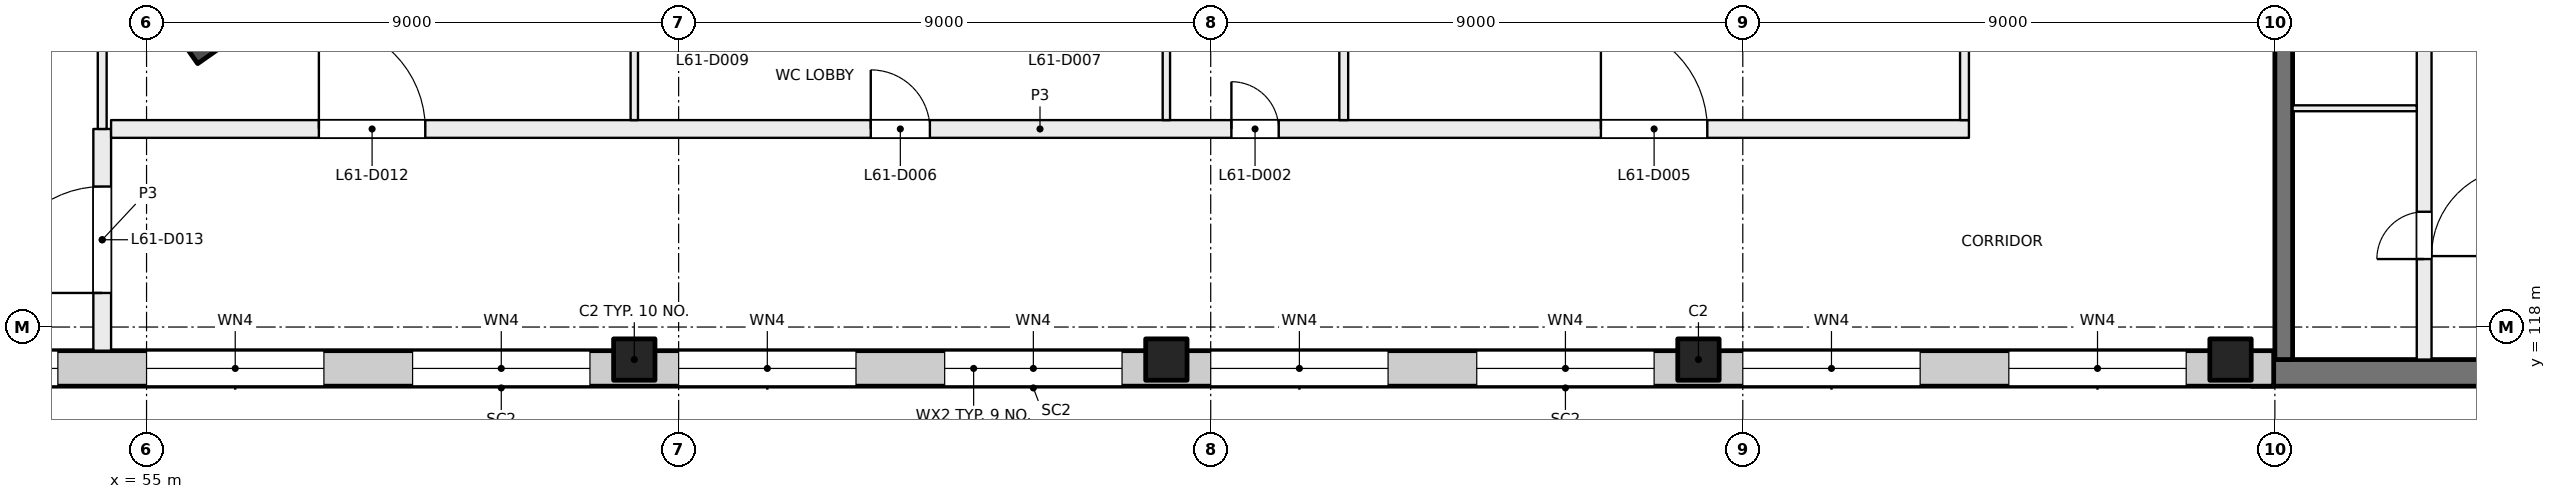
"""IFC4 building model, lengths in metres.
Left out: names, types, materials, properties, quantities, classifications, styles, units other than length and angle.
Written with IfcOpenShell. Run it as: python <this file> out.ifc"""

import sys

from ifc_helpers import new_model, si_unit, direction, frame, frame_2d, origin, origin_2d, place, context, subcontext, project, spatial, rectangle, hollow_rectangle, extrude, element, fill, save


model = new_model("IFC4")
c1 = context("Model", 3, precision=1e-05, world=origin(), true_north=direction((0.0, 1.0)))
c2 = subcontext(c1, "Body", "Model", "MODEL_VIEW")
j1 = project(units=[si_unit("LENGTHUNIT", "METRE"), si_unit("PLANEANGLEUNIT", "RADIAN")], contexts=[c1])
p1 = place(None, origin())
s1 = spatial("IfcSite", under=j1, at=p1, CompositionType="ELEMENT")
p2 = place(p1, origin())
s2 = spatial("IfcBuilding", under=s1, at=p2, CompositionType="ELEMENT")
p3 = place(p2, frame((0.0, 0.0, 257.5)))
s3 = spatial("IfcBuildingStorey", under=s2, at=p3, CompositionType="ELEMENT", Elevation=257.5)
p4 = place(p3, frame((56.036, 123.43, 0.0), z_axis=(0.0, 0.0, 1.0), x_axis=(0.573576436351, -0.819152044289, 0.0)))
e1 = element("IfcColumn", 1, at=p4, inside=s3, PredefinedType="COLUMN", context=c2, shape_type="SweptSolid", body=[
    extrude(hollow_rectangle(XDim=1.4, YDim=1.4, WallThickness=0.025, at=origin_2d()), origin(), (0.0, 0.0, 1.0), 4.0),
])
for number, where, z_axis, x_axis in (
    (2, (63.25, 117.45, 0.0), (0.0, 0.0, 1.0), (1.0, 0.0, 0.0)),
    (3, (72.25, 117.45, 0.0), (0.0, 0.0, 1.0), (1.0, 0.0, 0.0)),
    (4, (81.25, 117.45, 0.0), (0.0, 0.0, 1.0), (1.0, 0.0, 0.0)),
    (5, (90.25, 117.45, 0.0), (0.0, 0.0, 1.0), (1.0, 0.0, 0.0)),
):
    element("IfcColumn", number, at=place(p3, frame(where, z_axis=z_axis, x_axis=x_axis)), inside=s3, PredefinedType="COLUMN", context=c2, shape_type="SweptSolid", body=[
        extrude(rectangle(XDim=0.7, YDim=0.7, at=origin_2d()), origin(), (0.0, 0.0, 1.0), 4.0),
    ])
p5 = place(p3, frame((99.6, 117.225, 0.0), z_axis=(0.0, 0.0, 1.0), x_axis=(-1.0, 0.0, 0.0)))
e6 = element("IfcWall", 6, at=p5, inside=s3, PredefinedType="SHEAR", context=c2, shape_type="SweptSolid", body=[
    extrude(rectangle(XDim=9.0, YDim=0.45, at=frame_2d((4.5, 0.0))), origin(), (0.0, 0.0, 1.0), 4.0),
])
p6 = place(p3, frame((91.15, 126.2, 0.0), z_axis=(0.0, 0.0, 1.0), x_axis=(0.0, -1.0, 0.0)))
e7 = element("IfcWall", 7, at=p6, inside=s3, PredefinedType="SHEAR", context=c2, shape_type="SweptSolid", body=[
    extrude(rectangle(XDim=8.75, YDim=0.3, at=frame_2d((4.375, 0.0))), origin(), (0.0, 0.0, 1.0), 4.0),
])
p7 = place(p3, frame((90.98, 117.3, 0.0), z_axis=(0.0, 0.0, 1.0), x_axis=(-1.0, 0.0, 0.0)))
e8 = element("IfcWall", 8, at=p7, inside=s3, PredefinedType="SOLIDWALL", context=c2, shape_type="SweptSolid", body=[
    extrude(rectangle(XDim=43.98, YDim=0.6, at=frame_2d((21.99, 0.0))), origin(), (0.0, 0.0, 1.0), 3.625),
])
p8 = place(p7, frame((1.48, 0.0, 0.9)))
e9 = element("IfcOpeningElement", 9, at=p8, cuts=e8, PredefinedType="OPENING", context=c2, shape_type="SweptSolid", body=[
    extrude(rectangle(XDim=3.0, YDim=2.4, at=frame_2d((1.5, 1.2))), frame((0.0, 0.31, 0.0), z_axis=(0.0, -1.0, 0.0), x_axis=(1.0, 0.0, 0.0)), (0.0, 0.0, 1.0), 0.62),
])
p9 = place(p7, frame((5.98, 0.0, 0.9)))
e10 = element("IfcOpeningElement", 10, at=p9, cuts=e8, PredefinedType="OPENING", context=c2, shape_type="SweptSolid", body=[
    extrude(rectangle(XDim=3.0, YDim=2.4, at=frame_2d((1.5, 1.2))), frame((0.0, 0.31, 0.0), z_axis=(0.0, -1.0, 0.0), x_axis=(1.0, 0.0, 0.0)), (0.0, 0.0, 1.0), 0.62),
])
p10 = place(p7, frame((10.48, 0.0, 0.9)))
e11 = element("IfcOpeningElement", 11, at=p10, cuts=e8, PredefinedType="OPENING", context=c2, shape_type="SweptSolid", body=[
    extrude(rectangle(XDim=3.0, YDim=2.4, at=frame_2d((1.5, 1.2))), frame((0.0, 0.31, 0.0), z_axis=(0.0, -1.0, 0.0), x_axis=(1.0, 0.0, 0.0)), (0.0, 0.0, 1.0), 0.62),
])
p11 = place(p7, frame((14.98, 0.0, 0.9)))
e12 = element("IfcOpeningElement", 12, at=p11, cuts=e8, PredefinedType="OPENING", context=c2, shape_type="SweptSolid", body=[
    extrude(rectangle(XDim=3.0, YDim=2.4, at=frame_2d((1.5, 1.2))), frame((0.0, 0.31, 0.0), z_axis=(0.0, -1.0, 0.0), x_axis=(1.0, 0.0, 0.0)), (0.0, 0.0, 1.0), 0.62),
])
p12 = place(p7, frame((19.48, 0.0, 0.9)))
e13 = element("IfcOpeningElement", 13, at=p12, cuts=e8, PredefinedType="OPENING", context=c2, shape_type="SweptSolid", body=[
    extrude(rectangle(XDim=3.0, YDim=2.4, at=frame_2d((1.5, 1.2))), frame((0.0, 0.31, 0.0), z_axis=(0.0, -1.0, 0.0), x_axis=(1.0, 0.0, 0.0)), (0.0, 0.0, 1.0), 0.62),
])
p13 = place(p7, frame((23.98, 0.0, 0.9)))
e14 = element("IfcOpeningElement", 14, at=p13, cuts=e8, PredefinedType="OPENING", context=c2, shape_type="SweptSolid", body=[
    extrude(rectangle(XDim=3.0, YDim=2.4, at=frame_2d((1.5, 1.2))), frame((0.0, 0.31, 0.0), z_axis=(0.0, -1.0, 0.0), x_axis=(1.0, 0.0, 0.0)), (0.0, 0.0, 1.0), 0.62),
])
p14 = place(p7, frame((28.48, 0.0, 0.9)))
e15 = element("IfcOpeningElement", 15, at=p14, cuts=e8, PredefinedType="OPENING", context=c2, shape_type="SweptSolid", body=[
    extrude(rectangle(XDim=3.0, YDim=2.4, at=frame_2d((1.5, 1.2))), frame((0.0, 0.31, 0.0), z_axis=(0.0, -1.0, 0.0), x_axis=(1.0, 0.0, 0.0)), (0.0, 0.0, 1.0), 0.62),
])
p15 = place(p7, frame((32.98, 0.0, 0.9)))
e16 = element("IfcOpeningElement", 16, at=p15, cuts=e8, PredefinedType="OPENING", context=c2, shape_type="SweptSolid", body=[
    extrude(rectangle(XDim=3.0, YDim=2.4, at=frame_2d((1.5, 1.2))), frame((0.0, 0.31, 0.0), z_axis=(0.0, -1.0, 0.0), x_axis=(1.0, 0.0, 0.0)), (0.0, 0.0, 1.0), 0.62),
])
p16 = place(p7, frame((37.48, 0.0, 0.9)))
e17 = element("IfcOpeningElement", 17, at=p16, cuts=e8, PredefinedType="OPENING", context=c2, shape_type="SweptSolid", body=[
    extrude(rectangle(XDim=3.0, YDim=2.4, at=frame_2d((1.5, 1.2))), frame((0.0, 0.31, 0.0), z_axis=(0.0, -1.0, 0.0), x_axis=(1.0, 0.0, 0.0)), (0.0, 0.0, 1.0), 0.62),
])
p17 = place(p3, frame((93.525, 117.45, 0.0), z_axis=(0.0, 0.0, 1.0), x_axis=(0.0, 1.0, 0.0)))
e18 = element("IfcWall", 18, at=p17, inside=s3, PredefinedType="PARTITIONING", context=c2, shape_type="SweptSolid", body=[
    extrude(rectangle(XDim=8.5, YDim=0.25, at=frame_2d((4.25, 0.0))), origin(), (0.0, 0.0, 1.0), 3.625),
])
p18 = place(p17, frame((6.0, 0.0, 0.0)))
e19 = element("IfcOpeningElement", 19, at=p18, cuts=e18, PredefinedType="OPENING", context=c2, shape_type="SweptSolid", body=[
    extrude(rectangle(XDim=0.8, YDim=2.1, at=frame_2d((0.4, 1.05))), frame((0.0, 0.135, 0.0), z_axis=(0.0, -1.0, 0.0), x_axis=(1.0, 0.0, 0.0)), (0.0, 0.0, 1.0), 0.27),
])
p19 = place(p17, frame((1.7, 0.0, 0.0)))
e20 = element("IfcOpeningElement", 20, at=p19, cuts=e18, PredefinedType="OPENING", context=c2, shape_type="SweptSolid", body=[
    extrude(rectangle(XDim=0.8, YDim=2.1, at=frame_2d((0.4, 1.05))), frame((0.0, 0.135, 0.0), z_axis=(0.0, -1.0, 0.0), x_axis=(1.0, 0.0, 0.0)), (0.0, 0.0, 1.0), 0.27),
])
p20 = place(p3, frame((93.4, 121.7, 0.0), z_axis=(0.0, 0.0, 1.0), x_axis=(-1.0, 0.0, 0.0)))
e21 = element("IfcWall", 21, at=p20, inside=s3, PredefinedType="PARTITIONING", context=c2, shape_type="SweptSolid", body=[
    extrude(rectangle(XDim=2.1, YDim=0.1, at=frame_2d((1.05, 0.0))), origin(), (0.0, 0.0, 1.0), 3.625),
])
p21 = place(p3, frame((54.25, 117.6, 0.0), z_axis=(0.0, 0.0, 1.0), x_axis=(0.0, 1.0, 0.0)))
e22 = element("IfcWall", 22, at=p21, inside=s3, PredefinedType="PARTITIONING", context=c2, shape_type="SweptSolid", body=[
    extrude(rectangle(XDim=3.75, YDim=0.3, at=frame_2d((1.875, 0.0))), origin(), (0.0, 0.0, 1.0), 3.625),
])
p22 = place(p21, frame((0.977, 0.0, 0.0)))
e23 = element("IfcOpeningElement", 23, at=p22, cuts=e22, PredefinedType="OPENING", context=c2, shape_type="SweptSolid", body=[
    extrude(rectangle(XDim=1.8, YDim=2.1, at=frame_2d((0.9, 1.05))), frame((0.0, 0.16, 0.0), z_axis=(0.0, -1.0, 0.0), x_axis=(1.0, 0.0, 0.0)), (0.0, 0.0, 1.0), 0.32),
])
p23 = place(p3, frame((54.4, 121.35, 0.0), z_axis=(0.0, 0.0, 1.0), x_axis=(1.0, 0.0, 0.0)))
e24 = element("IfcWall", 24, at=p23, inside=s3, PredefinedType="PARTITIONING", context=c2, shape_type="SweptSolid", body=[
    extrude(rectangle(XDim=31.425, YDim=0.3, at=frame_2d((15.712, 0.0))), origin(), (0.0, 0.0, 1.0), 3.625),
])
p24 = place(p23, frame((18.95, 0.0, 0.0)))
e25 = element("IfcOpeningElement", 25, at=p24, cuts=e24, PredefinedType="OPENING", context=c2, shape_type="SweptSolid", body=[
    extrude(rectangle(XDim=0.8, YDim=2.1, at=frame_2d((0.4, 1.05))), frame((0.0, 0.16, 0.0), z_axis=(0.0, -1.0, 0.0), x_axis=(1.0, 0.0, 0.0)), (0.0, 0.0, 1.0), 0.32),
])
p25 = place(p23, frame((25.2, 0.0, 0.0)))
e26 = element("IfcOpeningElement", 26, at=p25, cuts=e24, PredefinedType="OPENING", context=c2, shape_type="SweptSolid", body=[
    extrude(rectangle(XDim=1.8, YDim=2.1, at=frame_2d((0.9, 1.05))), frame((0.0, 0.16, 0.0), z_axis=(0.0, -1.0, 0.0), x_axis=(1.0, 0.0, 0.0)), (0.0, 0.0, 1.0), 0.32),
])
p26 = place(p23, frame((12.85, 0.0, 0.0)))
e27 = element("IfcOpeningElement", 27, at=p26, cuts=e24, PredefinedType="OPENING", context=c2, shape_type="SweptSolid", body=[
    extrude(rectangle(XDim=1.0, YDim=2.1, at=frame_2d((0.5, 1.05))), frame((0.0, 0.16, 0.0), z_axis=(0.0, -1.0, 0.0), x_axis=(1.0, 0.0, 0.0)), (0.0, 0.0, 1.0), 0.32),
])
p27 = place(p23, frame((3.515, 0.0, 0.0)))
e28 = element("IfcOpeningElement", 28, at=p27, cuts=e24, PredefinedType="OPENING", context=c2, shape_type="SweptSolid", body=[
    extrude(rectangle(XDim=1.8, YDim=2.1, at=frame_2d((0.9, 1.05))), frame((0.0, 0.16, 0.0), z_axis=(0.0, -1.0, 0.0), x_axis=(1.0, 0.0, 0.0)), (0.0, 0.0, 1.0), 0.32),
])
p28 = place(p3, frame((54.25, 138.4, 0.0), z_axis=(0.0, 0.0, 1.0), x_axis=(0.0, -1.0, 0.0)))
e29 = element("IfcWall", 29, at=p28, inside=s3, PredefinedType="PARTITIONING", context=c2, shape_type="SweptSolid", body=[
    extrude(rectangle(XDim=17.05, YDim=0.15, at=frame_2d((8.525, 0.0))), origin(), (0.0, 0.0, 1.0), 3.625),
])
p29 = place(p3, frame((63.25, 121.5, 0.0), z_axis=(0.0, 0.0, 1.0), x_axis=(0.0, 1.0, 0.0)))
e30 = element("IfcWall", 30, at=p29, inside=s3, PredefinedType="PARTITIONING", context=c2, shape_type="SweptSolid", body=[
    extrude(rectangle(XDim=4.438, YDim=0.125, at=frame_2d((2.219, 0.0))), origin(), (0.0, 0.0, 1.0), 3.625),
])
p30 = place(p3, frame((72.25, 126.0, 0.0), z_axis=(0.0, 0.0, 1.0), x_axis=(0.0, -1.0, 0.0)))
e31 = element("IfcWall", 31, at=p30, inside=s3, PredefinedType="PARTITIONING", context=c2, shape_type="SweptSolid", body=[
    extrude(rectangle(XDim=4.5, YDim=0.125, at=frame_2d((2.25, 0.0))), origin(), (0.0, 0.0, 1.0), 3.625),
])
p31 = place(p3, frame((75.25, 121.5, 0.0), z_axis=(0.0, 0.0, 1.0), x_axis=(0.0, 1.0, 0.0)))
e32 = element("IfcWall", 32, at=p31, inside=s3, PredefinedType="PARTITIONING", context=c2, shape_type="SweptSolid", body=[
    extrude(rectangle(XDim=4.575, YDim=0.15, at=frame_2d((2.288, 0.0))), origin(), (0.0, 0.0, 1.0), 3.625),
])
p32 = place(p3, frame((85.75, 121.5, 0.0), z_axis=(0.0, 0.0, 1.0), x_axis=(0.0, 1.0, 0.0)))
e33 = element("IfcWall", 33, at=p32, inside=s3, PredefinedType="PARTITIONING", context=c2, shape_type="SweptSolid", body=[
    extrude(rectangle(XDim=8.45, YDim=0.15, at=frame_2d((4.225, 0.0))), origin(), (0.0, 0.0, 1.0), 3.625),
])
p33 = place(p8, origin())
e34 = element("IfcWindow", 34, at=p33, inside=s3, PartitioningType="SINGLE_PANEL", PredefinedType="WINDOW", context=c2, shape_type="SweptSolid", body=[
    extrude(rectangle(XDim=3.0, YDim=2.4, at=frame_2d((1.5, 1.2))), frame((0.0, 0.03, 0.0), z_axis=(0.0, -1.0, 0.0), x_axis=(1.0, 0.0, 0.0)), (0.0, 0.0, 1.0), 0.06),
])
fill(e9, e34)
p34 = place(p9, origin())
e35 = element("IfcWindow", 35, at=p34, inside=s3, PartitioningType="SINGLE_PANEL", PredefinedType="WINDOW", context=c2, shape_type="SweptSolid", body=[
    extrude(rectangle(XDim=3.0, YDim=2.4, at=frame_2d((1.5, 1.2))), frame((0.0, 0.03, 0.0), z_axis=(0.0, -1.0, 0.0), x_axis=(1.0, 0.0, 0.0)), (0.0, 0.0, 1.0), 0.06),
])
fill(e10, e35)
p35 = place(p10, origin())
e36 = element("IfcWindow", 36, at=p35, inside=s3, PartitioningType="SINGLE_PANEL", PredefinedType="WINDOW", context=c2, shape_type="SweptSolid", body=[
    extrude(rectangle(XDim=3.0, YDim=2.4, at=frame_2d((1.5, 1.2))), frame((0.0, 0.03, 0.0), z_axis=(0.0, -1.0, 0.0), x_axis=(1.0, 0.0, 0.0)), (0.0, 0.0, 1.0), 0.06),
])
fill(e11, e36)
p36 = place(p11, origin())
e37 = element("IfcWindow", 37, at=p36, inside=s3, PartitioningType="SINGLE_PANEL", PredefinedType="WINDOW", context=c2, shape_type="SweptSolid", body=[
    extrude(rectangle(XDim=3.0, YDim=2.4, at=frame_2d((1.5, 1.2))), frame((0.0, 0.03, 0.0), z_axis=(0.0, -1.0, 0.0), x_axis=(1.0, 0.0, 0.0)), (0.0, 0.0, 1.0), 0.06),
])
fill(e12, e37)
p37 = place(p12, origin())
e38 = element("IfcWindow", 38, at=p37, inside=s3, PartitioningType="SINGLE_PANEL", PredefinedType="WINDOW", context=c2, shape_type="SweptSolid", body=[
    extrude(rectangle(XDim=3.0, YDim=2.4, at=frame_2d((1.5, 1.2))), frame((0.0, 0.03, 0.0), z_axis=(0.0, -1.0, 0.0), x_axis=(1.0, 0.0, 0.0)), (0.0, 0.0, 1.0), 0.06),
])
fill(e13, e38)
p38 = place(p13, origin())
e39 = element("IfcWindow", 39, at=p38, inside=s3, PartitioningType="SINGLE_PANEL", PredefinedType="WINDOW", context=c2, shape_type="SweptSolid", body=[
    extrude(rectangle(XDim=3.0, YDim=2.4, at=frame_2d((1.5, 1.2))), frame((0.0, 0.03, 0.0), z_axis=(0.0, -1.0, 0.0), x_axis=(1.0, 0.0, 0.0)), (0.0, 0.0, 1.0), 0.06),
])
fill(e14, e39)
p39 = place(p14, origin())
e40 = element("IfcWindow", 40, at=p39, inside=s3, PartitioningType="SINGLE_PANEL", PredefinedType="WINDOW", context=c2, shape_type="SweptSolid", body=[
    extrude(rectangle(XDim=3.0, YDim=2.4, at=frame_2d((1.5, 1.2))), frame((0.0, 0.03, 0.0), z_axis=(0.0, -1.0, 0.0), x_axis=(1.0, 0.0, 0.0)), (0.0, 0.0, 1.0), 0.06),
])
fill(e15, e40)
p40 = place(p15, origin())
e41 = element("IfcWindow", 41, at=p40, inside=s3, PartitioningType="SINGLE_PANEL", PredefinedType="WINDOW", context=c2, shape_type="SweptSolid", body=[
    extrude(rectangle(XDim=3.0, YDim=2.4, at=frame_2d((1.5, 1.2))), frame((0.0, 0.03, 0.0), z_axis=(0.0, -1.0, 0.0), x_axis=(1.0, 0.0, 0.0)), (0.0, 0.0, 1.0), 0.06),
])
fill(e16, e41)
p41 = place(p16, origin())
e42 = element("IfcWindow", 42, at=p41, inside=s3, PartitioningType="SINGLE_PANEL", PredefinedType="WINDOW", context=c2, shape_type="SweptSolid", body=[
    extrude(rectangle(XDim=3.0, YDim=2.4, at=frame_2d((1.5, 1.2))), frame((0.0, 0.03, 0.0), z_axis=(0.0, -1.0, 0.0), x_axis=(1.0, 0.0, 0.0)), (0.0, 0.0, 1.0), 0.06),
])
fill(e17, e42)
p42 = place(p19, origin())
e43 = element("IfcDoor", 43, at=p42, inside=s3, OperationType="SINGLE_SWING_RIGHT", PredefinedType="DOOR", context=c2, shape_type="SweptSolid", body=[
    extrude(rectangle(XDim=0.8, YDim=2.1, at=frame_2d((0.4, 1.05))), frame((0.0, 0.025, 0.0), z_axis=(0.0, -1.0, 0.0), x_axis=(1.0, 0.0, 0.0)), (0.0, 0.0, 1.0), 0.05),
])
fill(e20, e43)
p43 = place(p24, origin())
e44 = element("IfcDoor", 44, at=p43, inside=s3, OperationType="SINGLE_SWING_LEFT", PredefinedType="DOOR", context=c2, shape_type="SweptSolid", body=[
    extrude(rectangle(XDim=0.8, YDim=2.1, at=frame_2d((0.4, 1.05))), frame((0.0, 0.025, 0.0), z_axis=(0.0, -1.0, 0.0), x_axis=(1.0, 0.0, 0.0)), (0.0, 0.0, 1.0), 0.05),
])
fill(e25, e44)
p44 = place(p25, origin())
e45 = element("IfcDoor", 45, at=p44, inside=s3, OperationType="DOUBLE_DOOR_SINGLE_SWING", PredefinedType="DOOR", context=c2, shape_type="SweptSolid", body=[
    extrude(rectangle(XDim=1.8, YDim=2.1, at=frame_2d((0.9, 1.05))), frame((0.0, 0.025, 0.0), z_axis=(0.0, -1.0, 0.0), x_axis=(1.0, 0.0, 0.0)), (0.0, 0.0, 1.0), 0.05),
])
fill(e26, e45)
p45 = place(p26, origin())
e46 = element("IfcDoor", 46, at=p45, inside=s3, OperationType="SINGLE_SWING_LEFT", PredefinedType="DOOR", context=c2, shape_type="SweptSolid", body=[
    extrude(rectangle(XDim=1.0, YDim=2.1, at=frame_2d((0.5, 1.05))), frame((0.0, 0.025, 0.0), z_axis=(0.0, -1.0, 0.0), x_axis=(1.0, 0.0, 0.0)), (0.0, 0.0, 1.0), 0.05),
])
fill(e27, e46)
p46 = place(p27, origin())
e47 = element("IfcDoor", 47, at=p46, inside=s3, OperationType="DOUBLE_DOOR_SINGLE_SWING", PredefinedType="DOOR", context=c2, shape_type="SweptSolid", body=[
    extrude(rectangle(XDim=1.8, YDim=2.1, at=frame_2d((0.9, 1.05))), frame((0.0, 0.025, 0.0), z_axis=(0.0, -1.0, 0.0), x_axis=(1.0, 0.0, 0.0)), (0.0, 0.0, 1.0), 0.05),
])
fill(e28, e47)
p47 = place(p22, origin())
e48 = element("IfcDoor", 48, at=p47, inside=s3, OperationType="DOUBLE_DOOR_SINGLE_SWING", PredefinedType="DOOR", context=c2, shape_type="SweptSolid", body=[
    extrude(rectangle(XDim=1.8, YDim=2.1, at=frame_2d((0.9, 1.05))), frame((0.0, 0.025, 0.0), z_axis=(0.0, -1.0, 0.0), x_axis=(1.0, 0.0, 0.0)), (0.0, 0.0, 1.0), 0.05),
])
fill(e23, e48)
save(model, sys.argv[1])
